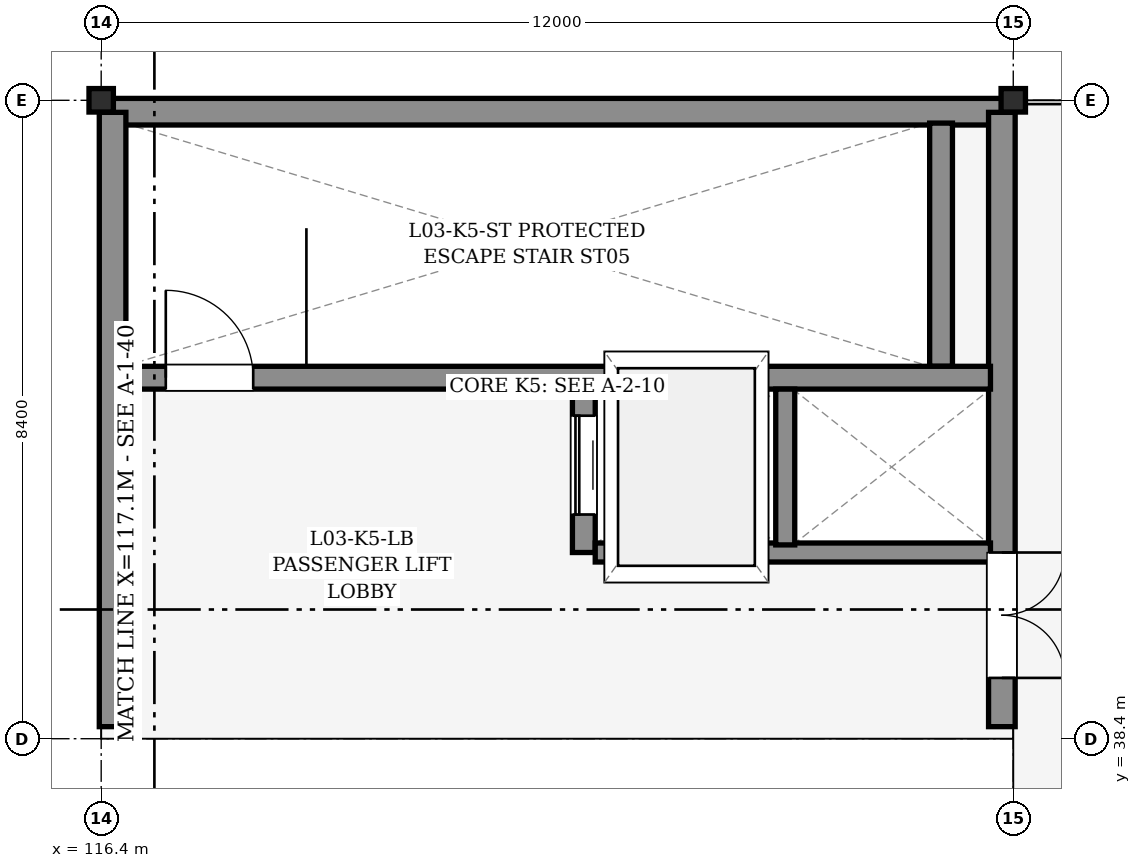
"""IFC4 building model, lengths in metres.
Left out: names, types, materials, properties, quantities, classifications, styles, units other than length and angle.
Written with IfcOpenShell. Run it as: python <this file> out.ifc"""

import sys

from ifc_helpers import new_model, si_unit, direction, frame, frame_2d, origin, origin_2d, place, context, subcontext, project, spatial, rectangle, i_section, extrude, element, fill, save


model = new_model("IFC4")
c1 = context("Model", 3, precision=1e-05, world=origin(), true_north=direction((0.0, 1.0)))
c2 = subcontext(c1, "Body", "Model", "MODEL_VIEW")
j1 = project(units=[si_unit("LENGTHUNIT", "METRE"), si_unit("PLANEANGLEUNIT", "RADIAN")], contexts=[c1])
p1 = place(None, origin())
s1 = spatial("IfcSite", under=j1, at=p1, CompositionType="ELEMENT")
p2 = place(p1, origin())
s2 = spatial("IfcBuilding", under=s1, at=p2, CompositionType="ELEMENT")
p3 = place(p2, frame((0.0, 0.0, 12.6)))
s3 = spatial("IfcBuildingStorey", under=s2, at=p3, CompositionType="ELEMENT", Elevation=12.6)
for number, where, z_axis, x_axis in (
    (1, (116.4, 38.4, 0.0), (0.0, 0.0, 1.0), (1.0, 0.0, 0.0)),
    (2, (116.4, 46.8, 0.0), (0.0, 0.0, 1.0), (1.0, 0.0, 0.0)),
    (3, (128.4, 38.4, 0.0), (0.0, 0.0, 1.0), (1.0, 0.0, 0.0)),
    (4, (128.4, 46.8, 0.0), (0.0, 0.0, 1.0), (1.0, 0.0, 0.0)),
):
    element("IfcColumn", number, at=place(p3, frame(where, z_axis=z_axis, x_axis=x_axis)), inside=s3, PredefinedType="COLUMN", context=c2, shape_type="SweptSolid", body=[
        extrude(i_section(OverallWidth=0.309, OverallDepth=0.321, WebThickness=0.014, FlangeThickness=0.022, FilletRadius=0.015, at=origin_2d()), origin(), (0.0, 0.0, 1.0), 3.6),
    ])
p4 = place(p3, frame((116.552, 46.65, 0.0), z_axis=(0.0, 0.0, 1.0), x_axis=(1.0, 0.0, 0.0)))
e5 = element("IfcWall", 5, at=p4, inside=s3, PredefinedType="SHEAR", context=c2, shape_type="SweptSolid", body=[
    extrude(rectangle(XDim=11.695, YDim=0.35, at=frame_2d((5.848, 0.0))), origin(), (0.0, 0.0, 1.0), 3.38),
])
p5 = place(p3, frame((116.552, 38.55, 0.0), z_axis=(0.0, 0.0, 1.0), x_axis=(1.0, 0.0, 0.0)))
e6 = element("IfcWall", 6, at=p5, inside=s3, PredefinedType="SHEAR", context=c2, shape_type="SweptSolid", body=[
    extrude(rectangle(XDim=11.695, YDim=0.3, at=frame_2d((5.848, 0.0))), origin(), (0.0, 0.0, 1.0), 3.38),
])
p6 = place(p3, frame((116.55, 38.559, 0.0), z_axis=(0.0, 0.0, 1.0), x_axis=(0.0, 1.0, 0.0)))
e7 = element("IfcWall", 7, at=p6, inside=s3, PredefinedType="SHEAR", context=c2, shape_type="SweptSolid", body=[
    extrude(rectangle(XDim=8.083, YDim=0.35, at=frame_2d((4.042, 0.0))), origin(), (0.0, 0.0, 1.0), 3.38),
])
p7 = place(p3, frame((128.25, 38.559, 0.0), z_axis=(0.0, 0.0, 1.0), x_axis=(0.0, 1.0, 0.0)))
e8 = element("IfcWall", 8, at=p7, inside=s3, PredefinedType="SHEAR", context=c2, shape_type="SweptSolid", body=[
    extrude(rectangle(XDim=8.083, YDim=0.35, at=frame_2d((4.042, 0.0))), origin(), (0.0, 0.0, 1.0), 3.38),
])
p8 = place(p7, frame((0.642, 0.0, 0.0)))
e9 = element("IfcOpeningElement", 9, at=p8, cuts=e8, PredefinedType="OPENING", context=c2, shape_type="SweptSolid", body=[
    extrude(rectangle(XDim=1.65, YDim=2.25, at=frame_2d((0.825, 1.125))), frame((0.0, 0.185, 0.0), z_axis=(0.0, -1.0, 0.0), x_axis=(1.0, 0.0, 0.0)), (0.0, 0.0, 1.0), 0.37),
])
p9 = place(p3, frame((127.45, 43.3, 0.0), z_axis=(0.0, 0.0, 1.0), x_axis=(0.0, 1.0, 0.0)))
e10 = element("IfcWall", 10, at=p9, inside=s3, PredefinedType="SHEAR", context=c2, shape_type="SweptSolid", body=[
    extrude(rectangle(XDim=3.2, YDim=0.3, at=frame_2d((1.6, 0.0))), origin(), (0.0, 0.0, 1.0), 3.38),
])
p10 = place(p3, frame((116.7, 43.15, 0.0), z_axis=(0.0, 0.0, 1.0), x_axis=(1.0, 0.0, 0.0)))
e11 = element("IfcWall", 11, at=p10, inside=s3, PredefinedType="SHEAR", context=c2, shape_type="SweptSolid", body=[
    extrude(rectangle(XDim=11.4, YDim=0.3, at=frame_2d((5.7, 0.0))), origin(), (0.0, 0.0, 1.0), 3.38),
])
p11 = place(p10, frame((0.55, 0.0, 0.0)))
e12 = element("IfcOpeningElement", 12, at=p11, cuts=e11, PredefinedType="OPENING", context=c2, shape_type="SweptSolid", body=[
    extrude(rectangle(XDim=1.15, YDim=2.15, at=frame_2d((0.575, 1.075))), frame((0.0, 0.16, 0.0), z_axis=(0.0, -1.0, 0.0), x_axis=(1.0, 0.0, 0.0)), (0.0, 0.0, 1.0), 0.32),
])
p12 = place(p3, frame((122.75, 40.85, 0.0), z_axis=(0.0, 0.0, 1.0), x_axis=(0.0, 1.0, 0.0)))
e13 = element("IfcWall", 13, at=p12, inside=s3, PredefinedType="SHEAR", context=c2, shape_type="SweptSolid", body=[
    extrude(rectangle(XDim=2.15, YDim=0.3, at=frame_2d((1.075, 0.0))), origin(), (0.0, 0.0, 1.0), 3.38),
])
p13 = place(p12, frame((0.5, 0.0, 0.0)))
e14 = element("IfcOpeningElement", 14, at=p13, cuts=e13, PredefinedType="OPENING", context=c2, shape_type="SweptSolid", body=[
    extrude(rectangle(XDim=1.3, YDim=2.3, at=frame_2d((0.65, 1.15))), frame((0.0, 0.16, 0.0), z_axis=(0.0, -1.0, 0.0), x_axis=(1.0, 0.0, 0.0)), (0.0, 0.0, 1.0), 0.32),
])
p14 = place(p3, frame((122.9, 40.85, 0.0), z_axis=(0.0, 0.0, 1.0), x_axis=(1.0, 0.0, 0.0)))
e15 = element("IfcWall", 15, at=p14, inside=s3, PredefinedType="PARTITIONING", context=c2, shape_type="SweptSolid", body=[
    extrude(rectangle(XDim=5.2, YDim=0.25, at=frame_2d((2.6, 0.0))), origin(), (0.0, 0.0, 1.0), 2.525),
])
p15 = place(p3, frame((125.4, 40.95, 0.0), z_axis=(0.0, 0.0, 1.0), x_axis=(0.0, 1.0, 0.0)))
e16 = element("IfcWall", 16, at=p15, inside=s3, PredefinedType="PARTITIONING", context=c2, shape_type="SweptSolid", body=[
    extrude(rectangle(XDim=2.05, YDim=0.25, at=frame_2d((1.025, 0.0))), origin(), (0.0, 0.0, 1.0), 2.525),
])
p16 = place(p8, frame((1.65, 0.0, 0.0), z_axis=(0.0, 0.0, 1.0), x_axis=(-1.0, 0.0, 0.0)))
e17 = element("IfcDoor", 17, at=p16, inside=s3, OperationType="DOUBLE_DOOR_SINGLE_SWING", PredefinedType="DOOR", context=c2, shape_type="SweptSolid", body=[
    extrude(rectangle(XDim=1.65, YDim=2.25, at=frame_2d((0.825, 1.125))), frame((0.0, 0.025, 0.0), z_axis=(0.0, -1.0, 0.0), x_axis=(1.0, 0.0, 0.0)), (0.0, 0.0, 1.0), 0.05),
])
fill(e9, e17)
p17 = place(p11, origin())
e18 = element("IfcDoor", 18, at=p17, inside=s3, OperationType="SINGLE_SWING_LEFT", PredefinedType="DOOR", context=c2, shape_type="SweptSolid", body=[
    extrude(rectangle(XDim=1.15, YDim=2.15, at=frame_2d((0.575, 1.075))), frame((0.0, 0.025, 0.0), z_axis=(0.0, -1.0, 0.0), x_axis=(1.0, 0.0, 0.0)), (0.0, 0.0, 1.0), 0.05),
])
fill(e12, e18)
p18 = place(p13, origin())
e19 = element("IfcDoor", 19, at=p18, inside=s3, OperationType="SLIDING_TO_LEFT", PredefinedType="DOOR", context=c2, shape_type="SweptSolid", body=[
    extrude(rectangle(XDim=1.3, YDim=2.3, at=frame_2d((0.65, 1.15))), frame((0.0, 0.025, 0.0), z_axis=(0.0, -1.0, 0.0), x_axis=(1.0, 0.0, 0.0)), (0.0, 0.0, 1.0), 0.05),
])
fill(e14, e19)
save(model, sys.argv[1])
